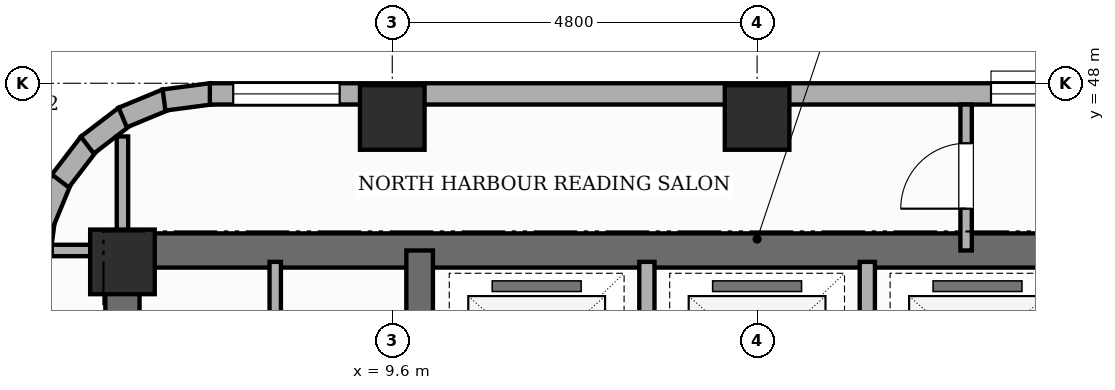
"""IFC4 building model, lengths in metres.
Left out: names, types, materials, properties, quantities, classifications, styles, units other than length and angle.
Written with IfcOpenShell. Run it as: python <this file> out.ifc"""

import sys

from ifc_helpers import new_model, si_unit, direction, frame, frame_2d, origin, origin_2d, place, context, subcontext, project, spatial, rectangle, extrude, element, fill, save


model = new_model("IFC4")
c1 = context("Model", 3, precision=1e-05, world=origin(), true_north=direction((0.0, 1.0)))
c2 = subcontext(c1, "Body", "Model", "MODEL_VIEW")
j1 = project(units=[si_unit("LENGTHUNIT", "METRE"), si_unit("PLANEANGLEUNIT", "RADIAN")], contexts=[c1])
p1 = place(None, origin())
s1 = spatial("IfcSite", under=j1, at=p1, CompositionType="ELEMENT")
p2 = place(p1, origin())
s2 = spatial("IfcBuilding", under=s1, at=p2, CompositionType="ELEMENT")
p3 = place(p2, frame((0.0, 0.0, 203.8)))
s3 = spatial("IfcBuildingStorey", under=s2, at=p3, CompositionType="ELEMENT", Elevation=203.8)
p4 = place(p3, frame((6.05, 30.675, 0.0), z_axis=(0.0, 0.0, 1.0), x_axis=(0.0, 1.0, 0.0)))
e1 = element("IfcWall", 1, at=p4, inside=s3, PredefinedType="SHEAR", context=c2, shape_type="SweptSolid", body=[
    extrude(rectangle(XDim=15.35, YDim=0.45, at=frame_2d((7.675, 0.0))), origin(), (0.0, 0.0, 1.0), 3.6),
])
p5 = place(p4, frame((10.675, 0.0, 0.0)))
e2 = element("IfcOpeningElement", 2, at=p5, cuts=e1, PredefinedType="OPENING", context=c2, shape_type="SweptSolid", body=[
    extrude(rectangle(XDim=0.95, YDim=2.15, at=frame_2d((0.475, 1.075))), frame((0.0, 0.235, 0.0), z_axis=(0.0, -1.0, 0.0), x_axis=(1.0, 0.0, 0.0)), (0.0, 0.0, 1.0), 0.47),
])
p6 = place(p3, frame((6.05, 45.8, 0.0), z_axis=(0.0, 0.0, 1.0), x_axis=(1.0, 0.0, 0.0)))
e3 = element("IfcWall", 3, at=p6, inside=s3, PredefinedType="SHEAR", context=c2, shape_type="SweptSolid", body=[
    extrude(rectangle(XDim=16.7, YDim=0.45, at=frame_2d((8.35, 0.0))), origin(), (0.0, 0.0, 1.0), 3.6),
])
p7 = place(p3, frame((9.96, 30.9, 0.0), z_axis=(0.0, 0.0, 1.0), x_axis=(0.0, 1.0, 0.0)))
e4 = element("IfcWall", 4, at=p7, inside=s3, PredefinedType="SHEAR", context=c2, shape_type="SweptSolid", body=[
    extrude(rectangle(XDim=14.9, YDim=0.35, at=frame_2d((7.45, 0.0))), origin(), (0.0, 0.0, 1.0), 3.6),
])
p8 = place(p7, frame((0.65, 0.0, 0.0)))
e5 = element("IfcOpeningElement", 5, at=p8, cuts=e4, PredefinedType="OPENING", context=c2, shape_type="SweptSolid", body=[
    extrude(rectangle(XDim=0.95, YDim=2.1, at=frame_2d((0.475, 1.05))), frame((0.0, 0.185, 0.0), z_axis=(0.0, -1.0, 0.0), x_axis=(1.0, 0.0, 0.0)), (0.0, 0.0, 1.0), 0.37),
])
p9 = place(p7, frame((10.45, 0.0, 0.0)))
e6 = element("IfcOpeningElement", 6, at=p9, cuts=e4, PredefinedType="OPENING", context=c2, shape_type="SweptSolid", body=[
    extrude(rectangle(XDim=1.0, YDim=2.15, at=frame_2d((0.5, 1.075))), frame((0.0, 0.185, 0.0), z_axis=(0.0, -1.0, 0.0), x_axis=(1.0, 0.0, 0.0)), (0.0, 0.0, 1.0), 0.37),
])
for number, where, z_axis, x_axis in (
    (7, (6.05, 45.65, 0.0), (0.0, 0.0, 1.0), (1.0, 0.0, 0.0)),
    (8, (9.6, 47.55, 0.0), (0.0, 0.0, 1.0), (1.0, 0.0, 0.0)),
    (9, (14.4, 47.55, 0.0), (0.0, 0.0, 1.0), (1.0, 0.0, 0.0)),
):
    element("IfcColumn", number, at=place(p3, frame(where, z_axis=z_axis, x_axis=x_axis)), inside=s3, PredefinedType="COLUMN", context=c2, shape_type="SweptSolid", body=[
        extrude(rectangle(XDim=0.85, YDim=0.85, at=origin_2d()), origin(), (0.0, 0.0, 1.0), 3.6),
    ])
for number, where, z_axis, x_axis in (
    (10, (4.939, 45.582, 0.0), (0.0, 0.0, 1.0), (0.131, 0.991, 0.0)),
    (11, (5.011, 46.167, 0.0), (0.0, 0.0, 1.0), (0.383, 0.924, 0.0)),
    (12, (5.233, 46.715, 0.0), (0.0, 0.0, 1.0), (0.609, 0.793, 0.0)),
    (13, (5.588, 47.186, 0.0), (0.0, 0.0, 1.0), (0.793, 0.609, 0.0)),
):
    element("IfcWall", number, at=place(p3, frame(where, z_axis=z_axis, x_axis=x_axis)), inside=s3, PredefinedType="STANDARD", context=c2, shape_type="SweptSolid", body=[
        extrude(rectangle(XDim=0.626, YDim=0.28, at=frame_2d((0.313, 0.0))), origin(), (0.0, 0.0, 1.0), 3.38),
    ])
p10 = place(p3, frame((6.054, 47.549, 0.0), z_axis=(0.0, 0.0, 1.0), x_axis=(0.923974080304, 0.382455093999, 0.0)))
e14 = element("IfcWall", 14, at=p10, inside=s3, PredefinedType="STANDARD", context=c2, shape_type="SweptSolid", body=[
    extrude(rectangle(XDim=0.626, YDim=0.28, at=frame_2d((0.313, 0.0))), origin(), (0.0, 0.0, 1.0), 3.38),
])
p11 = place(p3, frame((6.597, 47.779, 0.0), z_axis=(0.0, 0.0, 1.0), x_axis=(0.9914410257, 0.130555323746, 0.0)))
e15 = element("IfcWall", 15, at=p11, inside=s3, PredefinedType="STANDARD", context=c2, shape_type="SweptSolid", body=[
    extrude(rectangle(XDim=0.626, YDim=0.28, at=frame_2d((0.313, 0.0))), origin(), (0.0, 0.0, 1.0), 3.38),
])
p12 = place(p3, frame((7.2, 47.86, 0.0), z_axis=(0.0, 0.0, 1.0), x_axis=(1.0, 0.0, 0.0)))
e16 = element("IfcWall", 16, at=p12, inside=s3, PredefinedType="STANDARD", context=c2, shape_type="SweptSolid", body=[
    extrude(rectangle(XDim=43.2, YDim=0.28, at=frame_2d((21.6, 0.0))), origin(), (0.0, 0.0, 1.0), 2.66),
])
p13 = place(p12, frame((19.028, 0.0, 0.65)))
e17 = element("IfcOpeningElement", 17, at=p13, cuts=e16, PredefinedType="OPENING", context=c2, shape_type="SweptSolid", body=[
    extrude(rectangle(XDim=1.4, YDim=1.1, at=frame_2d((0.7, 0.55))), frame((0.0, 0.15, 0.0), z_axis=(0.0, -1.0, 0.0), x_axis=(1.0, 0.0, 0.0)), (0.0, 0.0, 1.0), 0.3),
])
p14 = place(p12, frame((0.308, 0.0, 0.65)))
e18 = element("IfcOpeningElement", 18, at=p14, cuts=e16, PredefinedType="OPENING", context=c2, shape_type="SweptSolid", body=[
    extrude(rectangle(XDim=1.4, YDim=1.1, at=frame_2d((0.7, 0.55))), frame((0.0, 0.15, 0.0), z_axis=(0.0, -1.0, 0.0), x_axis=(1.0, 0.0, 0.0)), (0.0, 0.0, 1.0), 0.3),
])
p15 = place(p12, frame((10.278, 0.0, 0.45)))
e19 = element("IfcOpeningElement", 19, at=p15, cuts=e16, PredefinedType="OPENING", context=c2, shape_type="SweptSolid", body=[
    extrude(rectangle(XDim=0.95, YDim=1.8, at=frame_2d((0.475, 0.9))), frame((0.0, 0.15, 0.0), z_axis=(0.0, -1.0, 0.0), x_axis=(1.0, 0.0, 0.0)), (0.0, 0.0, 1.0), 0.3),
])
for number, where, z_axis, x_axis in (
    (20, (12.95, 43.1, 0.0), (0.0, 0.0, 1.0), (0.0, 1.0, 0.0)),
    (21, (15.85, 43.1, 0.0), (0.0, 0.0, 1.0), (0.0, 1.0, 0.0)),
):
    element("IfcWall", number, at=place(p3, frame(where, z_axis=z_axis, x_axis=x_axis)), inside=s3, PredefinedType="POLYGONAL", context=c2, shape_type="SweptSolid", body=[
        extrude(rectangle(XDim=2.55, YDim=0.2, at=frame_2d((1.275, 0.0))), origin(), (0.0, 0.0, 1.0), 3.38),
    ])
p16 = place(p3, frame((8.06, 43.05, 0.0), z_axis=(0.0, 0.0, 1.0), x_axis=(0.0, 1.0, 0.0)))
e22 = element("IfcWall", 22, at=p16, inside=s3, PredefinedType="PARTITIONING", context=c2, shape_type="SweptSolid", body=[
    extrude(rectangle(XDim=2.6, YDim=0.15, at=frame_2d((1.3, 0.0))), origin(), (0.0, 0.0, 1.0), 3.38),
])
p17 = place(p3, frame((5.12, 45.8, 0.0), z_axis=(0.0, 0.0, 1.0), x_axis=(1.0, 0.0, 0.0)))
e23 = element("IfcWall", 23, at=p17, inside=s3, PredefinedType="PARTITIONING", context=c2, shape_type="SweptSolid", body=[
    extrude(rectangle(XDim=0.93, YDim=0.15, at=frame_2d((0.465, 0.0))), origin(), (0.0, 0.0, 1.0), 3.38),
])
p18 = place(p3, frame((6.05, 45.8, 0.0), z_axis=(0.0, 0.0, 1.0), x_axis=(0.0, 1.0, 0.0)))
e24 = element("IfcWall", 24, at=p18, inside=s3, PredefinedType="PARTITIONING", context=c2, shape_type="SweptSolid", body=[
    extrude(rectangle(XDim=1.5, YDim=0.15, at=frame_2d((0.75, 0.0))), origin(), (0.0, 0.0, 1.0), 3.38),
])
p19 = place(p3, frame((17.15, 45.8, 0.0), z_axis=(0.0, 0.0, 1.0), x_axis=(0.0, 1.0, 0.0)))
e25 = element("IfcWall", 25, at=p19, inside=s3, PredefinedType="PARTITIONING", context=c2, shape_type="SweptSolid", body=[
    extrude(rectangle(XDim=1.92, YDim=0.15, at=frame_2d((0.96, 0.0))), origin(), (0.0, 0.0, 1.0), 3.38),
])
p20 = place(p19, frame((0.55, 0.0, 0.0)))
e26 = element("IfcOpeningElement", 26, at=p20, cuts=e25, PredefinedType="OPENING", context=c2, shape_type="SweptSolid", body=[
    extrude(rectangle(XDim=0.86, YDim=2.1, at=frame_2d((0.43, 1.05))), frame((0.0, 0.085, 0.0), z_axis=(0.0, -1.0, 0.0), x_axis=(1.0, 0.0, 0.0)), (0.0, 0.0, 1.0), 0.17),
])
p21 = place(p14, origin())
e27 = element("IfcWindow", 27, at=p21, inside=s3, PartitioningType="SINGLE_PANEL", PredefinedType="WINDOW", context=c2, shape_type="SweptSolid", body=[
    extrude(rectangle(XDim=1.4, YDim=1.1, at=frame_2d((0.7, 0.55))), frame((0.0, 0.03, 0.0), z_axis=(0.0, -1.0, 0.0), x_axis=(1.0, 0.0, 0.0)), (0.0, 0.0, 1.0), 0.06),
])
fill(e18, e27)
p22 = place(p15, origin())
e28 = element("IfcWindow", 28, at=p22, inside=s3, PartitioningType="SINGLE_PANEL", PredefinedType="WINDOW", context=c2, shape_type="SweptSolid", body=[
    extrude(rectangle(XDim=0.95, YDim=1.8, at=frame_2d((0.475, 0.9))), frame((0.0, 0.03, 0.0), z_axis=(0.0, -1.0, 0.0), x_axis=(1.0, 0.0, 0.0)), (0.0, 0.0, 1.0), 0.06),
])
fill(e19, e28)
p23 = place(p20, origin())
e29 = element("IfcDoor", 29, at=p23, inside=s3, OperationType="SINGLE_SWING_LEFT", PredefinedType="DOOR", context=c2, shape_type="SweptSolid", body=[
    extrude(rectangle(XDim=0.86, YDim=2.1, at=frame_2d((0.43, 1.05))), frame((0.0, 0.025, 0.0), z_axis=(0.0, -1.0, 0.0), x_axis=(1.0, 0.0, 0.0)), (0.0, 0.0, 1.0), 0.05),
])
fill(e26, e29)
save(model, sys.argv[1])
